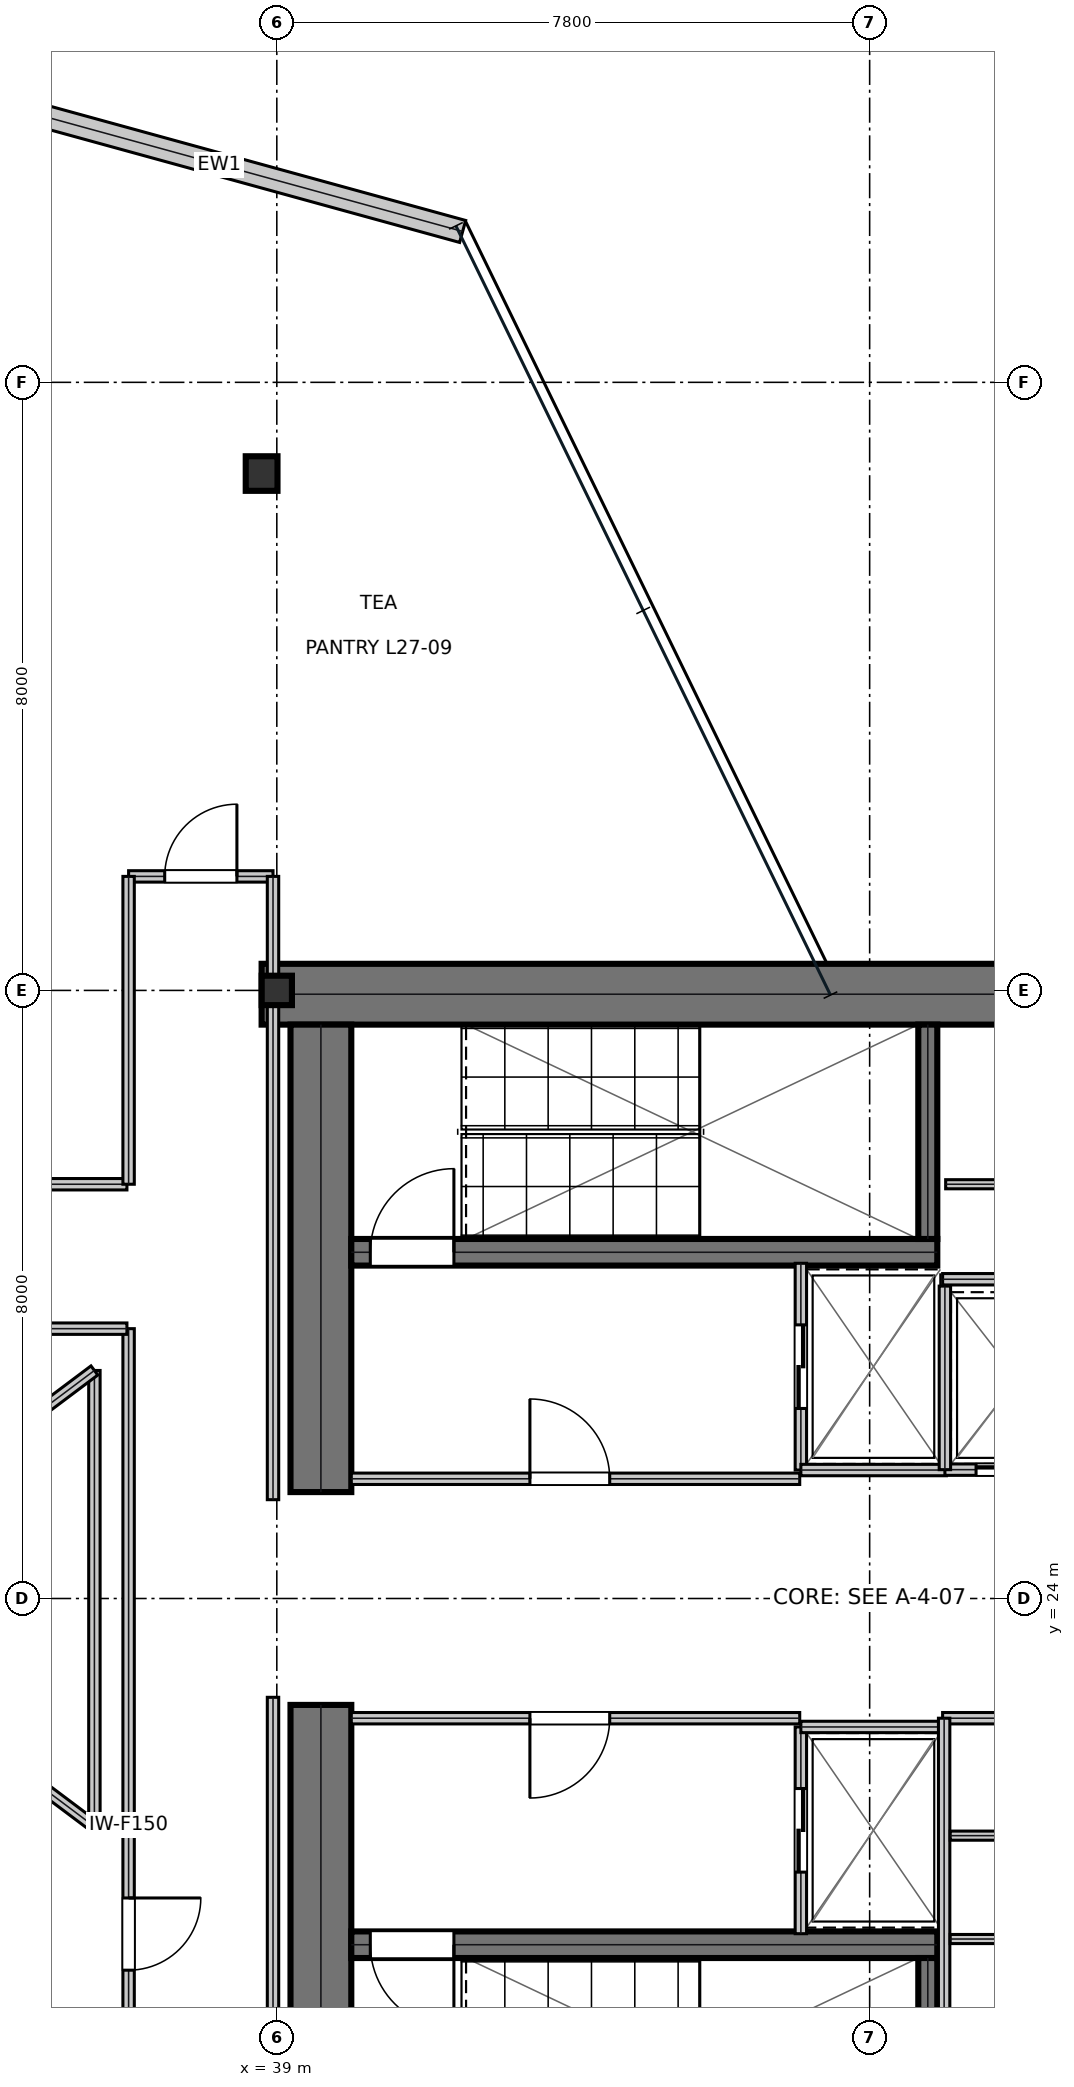
"""IFC4 building model, lengths in metres.
Left out: names, types, materials, properties, quantities, classifications, styles, units other than length and angle.
Written with IfcOpenShell. Run it as: python <this file> out.ifc"""

import sys

from ifc_helpers import new_model, si_unit, direction, frame, frame_2d, origin, origin_2d, place, context, subcontext, project, spatial, rectangle, i_section, extrude, element, fill, save


model = new_model("IFC4")
c1 = context("Model", 3, precision=1e-05, world=origin(), true_north=direction((0.0, 1.0)))
c2 = subcontext(c1, "Body", "Model", "MODEL_VIEW")
j1 = project(units=[si_unit("LENGTHUNIT", "METRE"), si_unit("PLANEANGLEUNIT", "RADIAN")], contexts=[c1])
p1 = place(None, origin())
s1 = spatial("IfcSite", under=j1, at=p1, CompositionType="ELEMENT")
p2 = place(p1, origin())
s2 = spatial("IfcBuilding", under=s1, at=p2, CompositionType="ELEMENT")
p3 = place(p2, frame((0.0, 0.0, 120.9)))
s3 = spatial("IfcBuildingStorey", under=s2, at=p3, CompositionType="ELEMENT", Elevation=120.9)
p4 = place(p3, frame((38.8, 31.95, 0.0), z_axis=(0.0, 0.0, 1.0), x_axis=(1.0, 0.0, 0.0)))
e1 = element("IfcWall", 1, at=p4, inside=s3, PredefinedType="SHEAR", context=c2, shape_type="SweptSolid", body=[
    extrude(rectangle(XDim=16.0, YDim=0.8, at=frame_2d((8.0, 0.0))), origin(), (0.0, 0.0, 1.0), 3.81),
])
for number, where, z_axis, x_axis in (
    (2, (39.58, 16.45, 0.0), (0.0, 0.0, 1.0), (0.0, 1.0, 0.0)),
    (3, (39.58, 25.4, 0.0), (0.0, 0.0, 1.0), (0.0, 1.0, 0.0)),
):
    element("IfcWall", number, at=place(p3, frame(where, z_axis=z_axis, x_axis=x_axis)), inside=s3, PredefinedType="SHEAR", context=c2, shape_type="SweptSolid", body=[
        extrude(rectangle(XDim=6.15, YDim=0.8, at=frame_2d((3.075, 0.0))), origin(), (0.0, 0.0, 1.0), 3.81),
    ])
p5 = place(p3, frame((39.98, 28.555, 0.0), z_axis=(0.0, 0.0, 1.0), x_axis=(1.0, 0.0, 0.0)))
e4 = element("IfcWall", 4, at=p5, inside=s3, PredefinedType="SHEAR", context=c2, shape_type="SweptSolid", body=[
    extrude(rectangle(XDim=7.71, YDim=0.35, at=frame_2d((3.855, 0.0))), origin(), (0.0, 0.0, 1.0), 3.81),
])
p6 = place(p5, frame((0.25, 0.0, 0.0)))
e5 = element("IfcOpeningElement", 5, at=p6, cuts=e4, PredefinedType="OPENING", context=c2, shape_type="SweptSolid", body=[
    extrude(rectangle(XDim=1.1, YDim=2.15, at=frame_2d((0.55, 1.075))), frame((0.0, 0.185, 0.0), z_axis=(0.0, -1.0, 0.0), x_axis=(1.0, 0.0, 0.0)), (0.0, 0.0, 1.0), 0.37),
])
p7 = place(p3, frame((39.98, 19.445, 0.0), z_axis=(0.0, 0.0, 1.0), x_axis=(1.0, 0.0, 0.0)))
e6 = element("IfcWall", 6, at=p7, inside=s3, PredefinedType="SHEAR", context=c2, shape_type="SweptSolid", body=[
    extrude(rectangle(XDim=7.71, YDim=0.35, at=frame_2d((3.855, 0.0))), origin(), (0.0, 0.0, 1.0), 3.81),
])
p8 = place(p7, frame((0.25, 0.0, 0.0)))
e7 = element("IfcOpeningElement", 7, at=p8, cuts=e6, PredefinedType="OPENING", context=c2, shape_type="SweptSolid", body=[
    extrude(rectangle(XDim=1.1, YDim=2.15, at=frame_2d((0.55, 1.075))), frame((0.0, 0.185, 0.0), z_axis=(0.0, -1.0, 0.0), x_axis=(1.0, 0.0, 0.0)), (0.0, 0.0, 1.0), 0.37),
])
for number, where, z_axis, x_axis in (
    (8, (47.565, 28.73, 0.0), (0.0, 0.0, 1.0), (0.0, 1.0, 0.0)),
    (9, (47.565, 16.45, 0.0), (0.0, 0.0, 1.0), (0.0, 1.0, 0.0)),
):
    element("IfcWall", number, at=place(p3, frame(where, z_axis=z_axis, x_axis=x_axis)), inside=s3, PredefinedType="SHEAR", context=c2, shape_type="SweptSolid", body=[
        extrude(rectangle(XDim=2.82, YDim=0.25, at=frame_2d((1.41, 0.0))), origin(), (0.0, 0.0, 1.0), 3.81),
    ])
p9 = place(p3, frame((39.0, 32.0, 0.0), z_axis=(0.0, 0.0, 1.0), x_axis=(1.0, 0.0, 0.0)))
e10 = element("IfcColumn", 10, at=p9, inside=s3, PredefinedType="COLUMN", context=c2, shape_type="SweptSolid", body=[
    extrude(i_section(OverallWidth=0.398, OverallDepth=0.387, WebThickness=0.021, FlangeThickness=0.033, at=origin_2d()), origin(), (0.0, 0.0, 1.0), 4.044),
])
p10 = place(p3, frame((38.8, 38.8, 0.016), z_axis=(0.0, 0.0, 1.0), x_axis=(1.0, 0.0, 0.0)))
e11 = element("IfcColumn", 11, at=p10, inside=s3, PredefinedType="COLUMN", context=c2, shape_type="SweptSolid", body=[
    extrude(i_section(OverallWidth=0.418, OverallDepth=0.455, WebThickness=0.042, FlangeThickness=0.068, at=origin_2d()), origin(), (0.0, 0.0, 1.0), 4.018),
])
p11 = place(p3, frame((41.445, 41.985, 0.0), z_axis=(0.0, 0.0, 1.0), x_axis=(-0.96422724659, 0.265077001894, 0.0)))
e12 = element("IfcWall", 12, at=p11, inside=s3, PredefinedType="STANDARD", context=c2, shape_type="SweptSolid", body=[
    extrude(rectangle(XDim=6.64, YDim=0.3, at=frame_2d((3.32, 0.0))), origin(), (0.0, 0.0, 1.0), 3.81),
])
p12 = place(p3, frame((39.98, 25.575, 0.0), z_axis=(0.0, 0.0, 1.0), x_axis=(1.0, 0.0, 0.0)))
e13 = element("IfcWall", 13, at=p12, inside=s3, PredefinedType="PARTITIONING", context=c2, shape_type="SweptSolid", body=[
    extrude(rectangle(XDim=5.9, YDim=0.15, at=frame_2d((2.95, 0.0))), origin(), (0.0, 0.0, 1.0), 3.81),
])
p13 = place(p12, frame((2.35, 0.0, 0.0)))
e14 = element("IfcOpeningElement", 14, at=p13, cuts=e13, PredefinedType="OPENING", context=c2, shape_type="SweptSolid", body=[
    extrude(rectangle(XDim=1.05, YDim=2.15, at=frame_2d((0.525, 1.075))), frame((0.0, 0.085, 0.0), z_axis=(0.0, -1.0, 0.0), x_axis=(1.0, 0.0, 0.0)), (0.0, 0.0, 1.0), 0.17),
])
p14 = place(p3, frame((39.98, 22.425, 0.0), z_axis=(0.0, 0.0, 1.0), x_axis=(1.0, 0.0, 0.0)))
e15 = element("IfcWall", 15, at=p14, inside=s3, PredefinedType="PARTITIONING", context=c2, shape_type="SweptSolid", body=[
    extrude(rectangle(XDim=5.9, YDim=0.15, at=frame_2d((2.95, 0.0))), origin(), (0.0, 0.0, 1.0), 3.81),
])
p15 = place(p14, frame((2.35, 0.0, 0.0)))
e16 = element("IfcOpeningElement", 16, at=p15, cuts=e15, PredefinedType="OPENING", context=c2, shape_type="SweptSolid", body=[
    extrude(rectangle(XDim=1.05, YDim=2.15, at=frame_2d((0.525, 1.075))), frame((0.0, 0.085, 0.0), z_axis=(0.0, -1.0, 0.0), x_axis=(1.0, 0.0, 0.0)), (0.0, 0.0, 1.0), 0.17),
])
p16 = place(p3, frame((45.895, 25.69, 0.0), z_axis=(0.0, 0.0, 1.0), x_axis=(0.0, 1.0, 0.0)))
e17 = element("IfcWall", 17, at=p16, inside=s3, PredefinedType="PARTITIONING", context=c2, shape_type="SweptSolid", body=[
    extrude(rectangle(XDim=2.72, YDim=0.15, at=frame_2d((1.36, 0.0))), origin(), (0.0, 0.0, 1.0), 3.81),
])
p17 = place(p16, frame((0.81, 0.0, 0.0)))
e18 = element("IfcOpeningElement", 18, at=p17, cuts=e17, PredefinedType="OPENING", context=c2, shape_type="SweptSolid", body=[
    extrude(rectangle(XDim=1.1, YDim=2.15, at=frame_2d((0.55, 1.075))), frame((0.0, 0.085, 0.0), z_axis=(0.0, -1.0, 0.0), x_axis=(1.0, 0.0, 0.0)), (0.0, 0.0, 1.0), 0.17),
])
p18 = place(p3, frame((45.895, 25.69, 0.0), z_axis=(0.0, 0.0, 1.0), x_axis=(1.0, 0.0, 0.0)))
e19 = element("IfcWall", 19, at=p18, inside=s3, PredefinedType="PARTITIONING", context=c2, shape_type="SweptSolid", body=[
    extrude(rectangle(XDim=1.915, YDim=0.15, at=frame_2d((0.958, 0.0))), origin(), (0.0, 0.0, 1.0), 3.81),
])
p19 = place(p3, frame((45.895, 19.59, 0.0), z_axis=(0.0, 0.0, 1.0), x_axis=(0.0, 1.0, 0.0)))
e20 = element("IfcWall", 20, at=p19, inside=s3, PredefinedType="PARTITIONING", context=c2, shape_type="SweptSolid", body=[
    extrude(rectangle(XDim=2.72, YDim=0.15, at=frame_2d((1.36, 0.0))), origin(), (0.0, 0.0, 1.0), 3.81),
])
p20 = place(p19, frame((0.81, 0.0, 0.0)))
e21 = element("IfcOpeningElement", 21, at=p20, cuts=e20, PredefinedType="OPENING", context=c2, shape_type="SweptSolid", body=[
    extrude(rectangle(XDim=1.1, YDim=2.15, at=frame_2d((0.55, 1.075))), frame((0.0, 0.085, 0.0), z_axis=(0.0, -1.0, 0.0), x_axis=(1.0, 0.0, 0.0)), (0.0, 0.0, 1.0), 0.17),
])
p21 = place(p3, frame((45.895, 22.31, 0.0), z_axis=(0.0, 0.0, 1.0), x_axis=(1.0, 0.0, 0.0)))
e22 = element("IfcWall", 22, at=p21, inside=s3, PredefinedType="PARTITIONING", context=c2, shape_type="SweptSolid", body=[
    extrude(rectangle(XDim=1.915, YDim=0.15, at=frame_2d((0.958, 0.0))), origin(), (0.0, 0.0, 1.0), 3.81),
])
p22 = place(p3, frame((47.79, 25.695, 0.0), z_axis=(0.0, 0.0, 1.0), x_axis=(1.0, 0.0, 0.0)))
e23 = element("IfcWall", 23, at=p22, inside=s3, PredefinedType="PARTITIONING", context=c2, shape_type="SweptSolid", body=[
    extrude(rectangle(XDim=1.92, YDim=0.15, at=frame_2d((0.96, 0.0))), origin(), (0.0, 0.0, 1.0), 3.81),
])
p23 = place(p22, frame((0.41, 0.0, 0.0)))
e24 = element("IfcOpeningElement", 24, at=p23, cuts=e23, PredefinedType="OPENING", context=c2, shape_type="SweptSolid", body=[
    extrude(rectangle(XDim=1.1, YDim=2.15, at=frame_2d((0.55, 1.075))), frame((0.0, 0.085, 0.0), z_axis=(0.0, -1.0, 0.0), x_axis=(1.0, 0.0, 0.0)), (0.0, 0.0, 1.0), 0.17),
])
p24 = place(p3, frame((47.79, 25.695, 0.0), z_axis=(0.0, 0.0, 1.0), x_axis=(0.0, 1.0, 0.0)))
e25 = element("IfcWall", 25, at=p24, inside=s3, PredefinedType="PARTITIONING", context=c2, shape_type="SweptSolid", body=[
    extrude(rectangle(XDim=2.415, YDim=0.15, at=frame_2d((1.208, 0.0))), origin(), (0.0, 0.0, 1.0), 3.81),
])
p25 = place(p3, frame((47.76, 22.425, 0.0), z_axis=(0.0, 0.0, 1.0), x_axis=(1.0, 0.0, 0.0)))
e26 = element("IfcWall", 26, at=p25, inside=s3, PredefinedType="PARTITIONING", context=c2, shape_type="SweptSolid", body=[
    extrude(rectangle(XDim=1.96, YDim=0.15, at=frame_2d((0.98, 0.0))), origin(), (0.0, 0.0, 1.0), 3.81),
])
p26 = place(p3, frame((47.78, 16.45, 0.0), z_axis=(0.0, 0.0, 1.0), x_axis=(0.0, 1.0, 0.0)))
e27 = element("IfcWall", 27, at=p26, inside=s3, PredefinedType="PARTITIONING", context=c2, shape_type="SweptSolid", body=[
    extrude(rectangle(XDim=5.975, YDim=0.15, at=frame_2d((2.988, 0.0))), origin(), (0.0, 0.0, 1.0), 3.81),
])
for number, where, z_axis, x_axis in (
    (28, (47.86, 19.52, 0.0), (0.0, 0.0, 1.0), (1.0, 0.0, 0.0)),
    (29, (47.86, 20.88, 0.0), (0.0, 0.0, 1.0), (1.0, 0.0, 0.0)),
):
    element("IfcWall", number, at=place(p3, frame(where, z_axis=z_axis, x_axis=x_axis)), inside=s3, PredefinedType="PARTITIONING", context=c2, shape_type="SweptSolid", body=[
        extrude(rectangle(XDim=1.76, YDim=0.12, at=frame_2d((0.88, 0.0))), origin(), (0.0, 0.0, 1.0), 3.81),
    ])
p27 = place(p3, frame((47.76, 28.2, 0.0), z_axis=(0.0, 0.0, 1.0), x_axis=(1.0, 0.0, 0.0)))
e30 = element("IfcWall", 30, at=p27, inside=s3, PredefinedType="PARTITIONING", context=c2, shape_type="SweptSolid", body=[
    extrude(rectangle(XDim=1.99, YDim=0.15, at=frame_2d((0.995, 0.0))), origin(), (0.0, 0.0, 1.0), 3.81),
])
p28 = place(p3, frame((47.8, 29.45, 0.0), z_axis=(0.0, 0.0, 1.0), x_axis=(1.0, 0.0, 0.0)))
e31 = element("IfcWall", 31, at=p28, inside=s3, PredefinedType="PARTITIONING", context=c2, shape_type="SweptSolid", body=[
    extrude(rectangle(XDim=5.86, YDim=0.12, at=frame_2d((2.93, 0.0))), origin(), (0.0, 0.0, 1.0), 3.81),
])
p29 = place(p28, frame((3.4, 0.0, 0.0)))
e32 = element("IfcOpeningElement", 32, at=p29, cuts=e31, PredefinedType="OPENING", context=c2, shape_type="SweptSolid", body=[
    extrude(rectangle(XDim=0.85, YDim=2.15, at=frame_2d((0.425, 1.075))), frame((0.0, 0.07, 0.0), z_axis=(0.0, -1.0, 0.0), x_axis=(1.0, 0.0, 0.0)), (0.0, 0.0, 1.0), 0.14),
])
p30 = place(p3, frame((37.05, 14.5, 0.0), z_axis=(0.0, 0.0, 1.0), x_axis=(0.0, 1.0, 0.0)))
e33 = element("IfcWall", 33, at=p30, inside=s3, PredefinedType="PARTITIONING", context=c2, shape_type="SweptSolid", body=[
    extrude(rectangle(XDim=13.05, YDim=0.15, at=frame_2d((6.525, 0.0))), origin(), (0.0, 0.0, 1.0), 3.19),
])
p31 = place(p30, frame((4.61, 0.0, 0.0)))
e34 = element("IfcOpeningElement", 34, at=p31, cuts=e33, PredefinedType="OPENING", context=c2, shape_type="SweptSolid", body=[
    extrude(rectangle(XDim=0.95, YDim=2.15, at=frame_2d((0.475, 1.075))), frame((0.0, 0.085, 0.0), z_axis=(0.0, -1.0, 0.0), x_axis=(1.0, 0.0, 0.0)), (0.0, 0.0, 1.0), 0.17),
])
p32 = place(p3, frame((29.4, 29.45, 0.0), z_axis=(0.0, 0.0, 1.0), x_axis=(1.0, 0.0, 0.0)))
e35 = element("IfcWall", 35, at=p32, inside=s3, PredefinedType="PARTITIONING", context=c2, shape_type="SweptSolid", body=[
    extrude(rectangle(XDim=7.628, YDim=0.15, at=frame_2d((3.814, 0.0))), origin(), (0.0, 0.0, 1.0), 3.19),
])
p33 = place(p32, frame((3.339, 0.0, 0.0)))
e36 = element("IfcOpeningElement", 36, at=p33, cuts=e35, PredefinedType="OPENING", context=c2, shape_type="SweptSolid", body=[
    extrude(rectangle(XDim=0.95, YDim=2.15, at=frame_2d((0.475, 1.075))), frame((0.0, 0.085, 0.0), z_axis=(0.0, -1.0, 0.0), x_axis=(1.0, 0.0, 0.0)), (0.0, 0.0, 1.0), 0.17),
])
p34 = place(p3, frame((37.05, 33.5, 0.0), z_axis=(0.0, 0.0, 1.0), x_axis=(1.0, 0.0, 0.0)))
e37 = element("IfcWall", 37, at=p34, inside=s3, PredefinedType="PARTITIONING", context=c2, shape_type="SweptSolid", body=[
    extrude(rectangle(XDim=1.9, YDim=0.15, at=frame_2d((0.95, 0.0))), origin(), (0.0, 0.0, 1.0), 3.19),
])
p35 = place(p34, frame((0.475, 0.0, 0.0)))
e38 = element("IfcOpeningElement", 38, at=p35, cuts=e37, PredefinedType="OPENING", context=c2, shape_type="SweptSolid", body=[
    extrude(rectangle(XDim=0.95, YDim=2.15, at=frame_2d((0.475, 1.075))), frame((0.0, 0.085, 0.0), z_axis=(0.0, -1.0, 0.0), x_axis=(1.0, 0.0, 0.0)), (0.0, 0.0, 1.0), 0.17),
])
p36 = place(p3, frame((38.95, 14.5, 0.0), z_axis=(0.0, 0.0, 1.0), x_axis=(0.0, 1.0, 0.0)))
e39 = element("IfcWall", 39, at=p36, inside=s3, PredefinedType="PARTITIONING", context=c2, shape_type="SweptSolid", body=[
    extrude(rectangle(XDim=8.2, YDim=0.15, at=frame_2d((4.1, 0.0))), origin(), (0.0, 0.0, 1.0), 3.19),
])
p37 = place(p3, frame((29.4, 27.55, 0.0), z_axis=(0.0, 0.0, 1.0), x_axis=(1.0, 0.0, 0.0)))
e40 = element("IfcWall", 40, at=p37, inside=s3, PredefinedType="PARTITIONING", context=c2, shape_type="SweptSolid", body=[
    extrude(rectangle(XDim=7.628, YDim=0.15, at=frame_2d((3.814, 0.0))), origin(), (0.0, 0.0, 1.0), 3.19),
])
p38 = place(p3, frame((37.05, 29.45, 0.0), z_axis=(0.0, 0.0, 1.0), x_axis=(0.0, 1.0, 0.0)))
e41 = element("IfcWall", 41, at=p38, inside=s3, PredefinedType="PARTITIONING", context=c2, shape_type="SweptSolid", body=[
    extrude(rectangle(XDim=4.05, YDim=0.15, at=frame_2d((2.025, 0.0))), origin(), (0.0, 0.0, 1.0), 3.19),
])
p39 = place(p3, frame((38.95, 25.3, 0.0), z_axis=(0.0, 0.0, 1.0), x_axis=(0.0, 1.0, 0.0)))
e42 = element("IfcWall", 42, at=p39, inside=s3, PredefinedType="PARTITIONING", context=c2, shape_type="SweptSolid", body=[
    extrude(rectangle(XDim=8.2, YDim=0.15, at=frame_2d((4.1, 0.0))), origin(), (0.0, 0.0, 1.0), 3.19),
])
p40 = place(p3, frame((32.6, 24.0, 0.0), z_axis=(0.0, 0.0, 1.0), x_axis=(0.8, -0.6, 0.0)))
e43 = element("IfcWall", 43, at=p40, inside=s3, PredefinedType="MOVABLE", context=c2, shape_type="SweptSolid", body=[
    extrude(rectangle(XDim=5.0, YDim=0.15, at=frame_2d((2.5, 0.0))), origin(), (0.0, 0.0, 1.0), 3.81),
])
p41 = place(p3, frame((36.6, 21.0, 0.0), z_axis=(0.0, 0.0, 1.0), x_axis=(0.0, 1.0, 0.0)))
e44 = element("IfcWall", 44, at=p41, inside=s3, PredefinedType="MOVABLE", context=c2, shape_type="SweptSolid", body=[
    extrude(rectangle(XDim=6.0, YDim=0.15, at=frame_2d((3.0, 0.0))), origin(), (0.0, 0.0, 1.0), 3.81),
])
p42 = place(p3, frame((36.6, 27.0, 0.0), z_axis=(0.0, 0.0, 1.0), x_axis=(-0.8, -0.6, 0.0)))
e45 = element("IfcWall", 45, at=p42, inside=s3, PredefinedType="MOVABLE", context=c2, shape_type="SweptSolid", body=[
    extrude(rectangle(XDim=5.0, YDim=0.15, at=frame_2d((2.5, 0.0))), origin(), (0.0, 0.0, 1.0), 3.81),
])
p43 = place(p13, origin())
e46 = element("IfcDoor", 46, at=p43, inside=s3, OperationType="SINGLE_SWING_LEFT", PredefinedType="DOOR", context=c2, shape_type="SweptSolid", body=[
    extrude(rectangle(XDim=1.05, YDim=2.15, at=frame_2d((0.525, 1.075))), frame((0.0, 0.025, 0.0), z_axis=(0.0, -1.0, 0.0), x_axis=(1.0, 0.0, 0.0)), (0.0, 0.0, 1.0), 0.05),
])
fill(e14, e46)
p44 = place(p15, frame((1.05, 0.0, 0.0), z_axis=(0.0, 0.0, 1.0), x_axis=(-1.0, 0.0, 0.0)))
e47 = element("IfcDoor", 47, at=p44, inside=s3, OperationType="SINGLE_SWING_RIGHT", PredefinedType="DOOR", context=c2, shape_type="SweptSolid", body=[
    extrude(rectangle(XDim=1.05, YDim=2.15, at=frame_2d((0.525, 1.075))), frame((0.0, 0.025, 0.0), z_axis=(0.0, -1.0, 0.0), x_axis=(1.0, 0.0, 0.0)), (0.0, 0.0, 1.0), 0.05),
])
fill(e16, e47)
p45 = place(p17, frame((1.1, 0.0, 0.0), z_axis=(0.0, 0.0, 1.0), x_axis=(-1.0, 0.0, 0.0)))
e48 = element("IfcDoor", 48, at=p45, inside=s3, OperationType="DOUBLE_DOOR_SLIDING", PredefinedType="DOOR", context=c2, shape_type="SweptSolid", body=[
    extrude(rectangle(XDim=1.1, YDim=2.15, at=frame_2d((0.55, 1.075))), frame((0.0, 0.025, 0.0), z_axis=(0.0, -1.0, 0.0), x_axis=(1.0, 0.0, 0.0)), (0.0, 0.0, 1.0), 0.05),
])
fill(e18, e48)
p46 = place(p20, frame((1.1, 0.0, 0.0), z_axis=(0.0, 0.0, 1.0), x_axis=(-1.0, 0.0, 0.0)))
e49 = element("IfcDoor", 49, at=p46, inside=s3, OperationType="DOUBLE_DOOR_SLIDING", PredefinedType="DOOR", context=c2, shape_type="SweptSolid", body=[
    extrude(rectangle(XDim=1.1, YDim=2.15, at=frame_2d((0.55, 1.075))), frame((0.0, 0.025, 0.0), z_axis=(0.0, -1.0, 0.0), x_axis=(1.0, 0.0, 0.0)), (0.0, 0.0, 1.0), 0.05),
])
fill(e21, e49)
p47 = place(p23, frame((1.1, 0.0, 0.0), z_axis=(0.0, 0.0, 1.0), x_axis=(-1.0, 0.0, 0.0)))
e50 = element("IfcDoor", 50, at=p47, inside=s3, OperationType="DOUBLE_DOOR_SLIDING", PredefinedType="DOOR", context=c2, shape_type="SweptSolid", body=[
    extrude(rectangle(XDim=1.1, YDim=2.15, at=frame_2d((0.55, 1.075))), frame((0.0, 0.025, 0.0), z_axis=(0.0, -1.0, 0.0), x_axis=(1.0, 0.0, 0.0)), (0.0, 0.0, 1.0), 0.05),
])
fill(e24, e50)
p48 = place(p31, frame((0.95, 0.0, 0.0), z_axis=(0.0, 0.0, 1.0), x_axis=(-1.0, 0.0, 0.0)))
e51 = element("IfcDoor", 51, at=p48, inside=s3, OperationType="SINGLE_SWING_LEFT", PredefinedType="DOOR", context=c2, shape_type="SweptSolid", body=[
    extrude(rectangle(XDim=0.95, YDim=2.15, at=frame_2d((0.475, 1.075))), frame((0.0, 0.025, 0.0), z_axis=(0.0, -1.0, 0.0), x_axis=(1.0, 0.0, 0.0)), (0.0, 0.0, 1.0), 0.05),
])
fill(e34, e51)
p49 = place(p35, origin())
e52 = element("IfcDoor", 52, at=p49, inside=s3, OperationType="SINGLE_SWING_RIGHT", PredefinedType="DOOR", context=c2, shape_type="SweptSolid", body=[
    extrude(rectangle(XDim=0.95, YDim=2.15, at=frame_2d((0.475, 1.075))), frame((0.0, 0.025, 0.0), z_axis=(0.0, -1.0, 0.0), x_axis=(1.0, 0.0, 0.0)), (0.0, 0.0, 1.0), 0.05),
])
fill(e38, e52)
p50 = place(p6, origin())
e53 = element("IfcDoor", 53, at=p50, inside=s3, OperationType="SINGLE_SWING_RIGHT", PredefinedType="DOOR", context=c2, shape_type="SweptSolid", body=[
    extrude(rectangle(XDim=1.1, YDim=2.15, at=frame_2d((0.55, 1.075))), frame((0.0, 0.025, 0.0), z_axis=(0.0, -1.0, 0.0), x_axis=(1.0, 0.0, 0.0)), (0.0, 0.0, 1.0), 0.05),
])
fill(e5, e53)
p51 = place(p8, frame((1.1, 0.0, 0.0), z_axis=(0.0, 0.0, 1.0), x_axis=(-1.0, 0.0, 0.0)))
e54 = element("IfcDoor", 54, at=p51, inside=s3, OperationType="SINGLE_SWING_LEFT", PredefinedType="DOOR", context=c2, shape_type="SweptSolid", body=[
    extrude(rectangle(XDim=1.1, YDim=2.15, at=frame_2d((0.55, 1.075))), frame((0.0, 0.025, 0.0), z_axis=(0.0, -1.0, 0.0), x_axis=(1.0, 0.0, 0.0)), (0.0, 0.0, 1.0), 0.05),
])
fill(e7, e54)
save(model, sys.argv[1])
